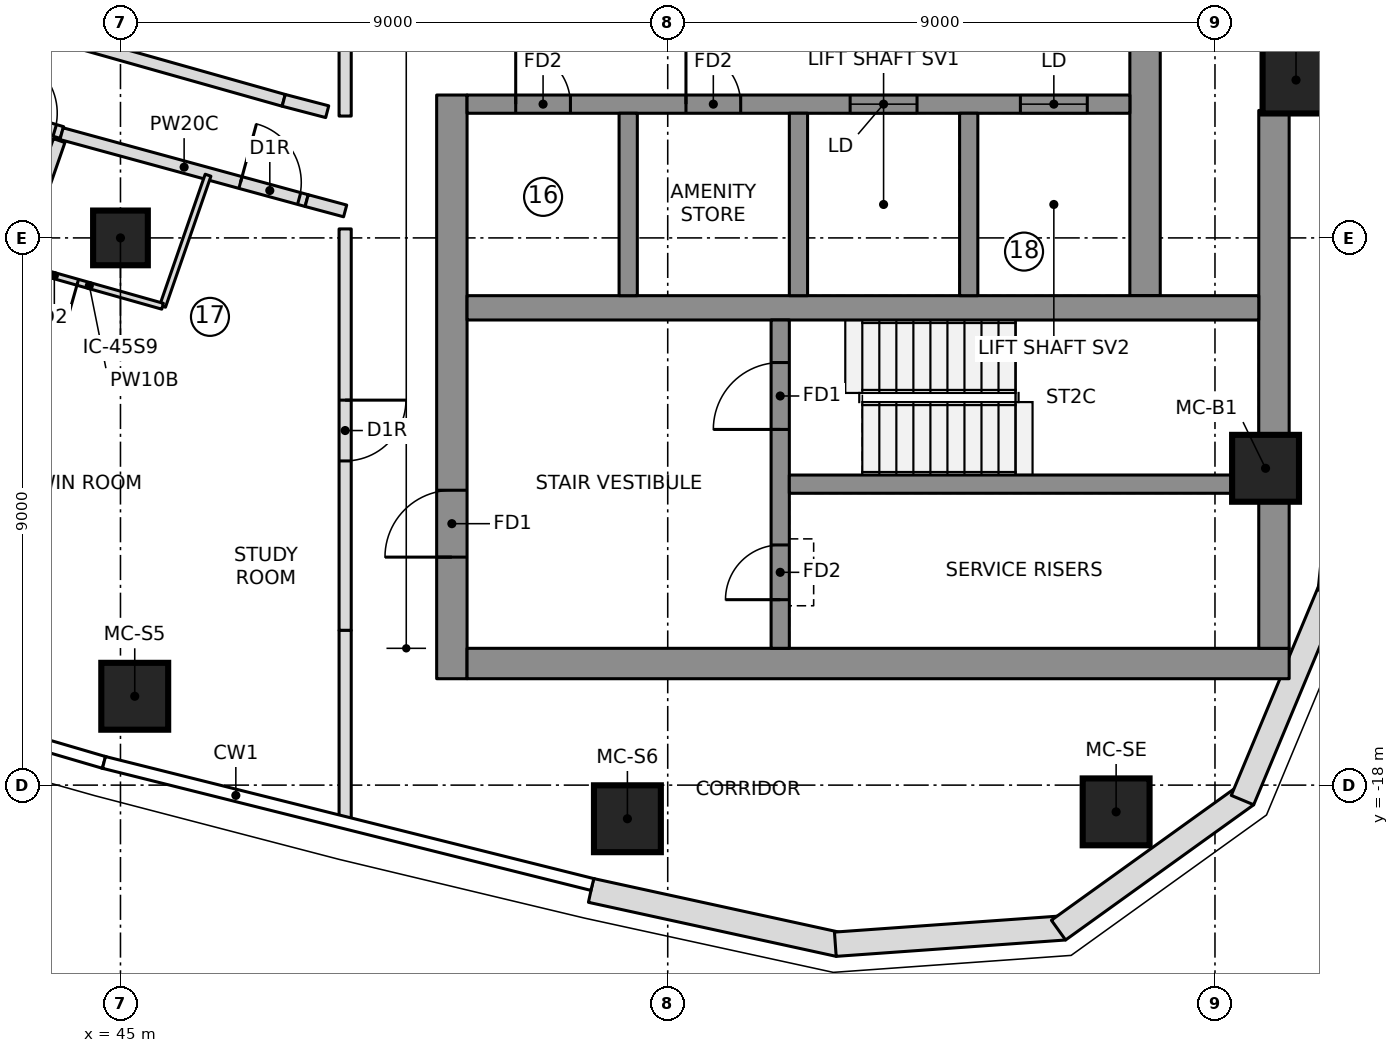
"""IFC4 building model, lengths in metres.
Left out: names, types, materials, properties, quantities, classifications, styles, units other than length and angle.
Written with IfcOpenShell. Run it as: python <this file> out.ifc"""

import sys

from ifc_helpers import new_model, si_unit, direction, frame, frame_2d, origin, origin_2d, place, context, subcontext, project, spatial, polyline, rectangle, outline, extrude, element, fill, save


model = new_model("IFC4")
c1 = context("Model", 3, precision=1e-05, world=origin(), true_north=direction((0.0, 1.0)))
c2 = subcontext(c1, "Body", "Model", "MODEL_VIEW")
j1 = project(units=[si_unit("LENGTHUNIT", "METRE"), si_unit("PLANEANGLEUNIT", "RADIAN")], contexts=[c1])
p1 = place(None, origin())
s1 = spatial("IfcSite", under=j1, at=p1, CompositionType="ELEMENT")
p2 = place(p1, origin())
s2 = spatial("IfcBuilding", under=s1, at=p2, CompositionType="ELEMENT")
p3 = place(p2, frame((0.0, 0.0, 296.3)))
s3 = spatial("IfcBuildingStorey", under=s2, at=p3, CompositionType="ELEMENT", Elevation=296.3)
p4 = place(p3, frame((50.45, -16.25, 0.0), z_axis=(0.0, 0.0, 1.0), x_axis=(0.0, 1.0, 0.0)))
e1 = element("IfcWall", 1, at=p4, inside=s3, PredefinedType="SHEAR", context=c2, shape_type="SweptSolid", body=[
    extrude(rectangle(XDim=9.6, YDim=0.5, at=frame_2d((4.8, 0.0))), origin(), (0.0, 0.0, 1.0), 3.55),
])
p5 = place(p4, frame((2.0, 0.0, 0.0)))
e2 = element("IfcOpeningElement", 2, at=p5, cuts=e1, PredefinedType="OPENING", context=c2, shape_type="SweptSolid", body=[
    extrude(rectangle(XDim=1.1, YDim=2.1, at=frame_2d((0.55, 1.05))), frame((0.0, 0.26, 0.0), z_axis=(0.0, -1.0, 0.0), x_axis=(1.0, 0.0, 0.0)), (0.0, 0.0, 1.0), 0.52),
])
p6 = place(p3, frame((50.7, -16.0, 0.0), z_axis=(0.0, 0.0, 1.0), x_axis=(1.0, 0.0, 0.0)))
e3 = element("IfcWall", 3, at=p6, inside=s3, PredefinedType="SHEAR", context=c2, shape_type="SweptSolid", body=[
    extrude(rectangle(XDim=13.52, YDim=0.5, at=frame_2d((6.76, 0.0))), origin(), (0.0, 0.0, 1.0), 3.55),
])
p7 = place(p3, frame((63.97, -15.75, 0.0), z_axis=(0.0, 0.0, 1.0), x_axis=(0.0, 1.0, 0.0)))
e4 = element("IfcWall", 4, at=p7, inside=s3, PredefinedType="SHEAR", context=c2, shape_type="SweptSolid", body=[
    extrude(rectangle(XDim=8.847, YDim=0.5, at=frame_2d((4.423, 0.0))), origin(), (0.0, 0.0, 1.0), 3.55),
])
p8 = place(p3, frame((61.85, -9.95, 0.0), z_axis=(0.0, 0.0, 1.0), x_axis=(0.0, 1.0, 0.0)))
e5 = element("IfcWall", 5, at=p8, inside=s3, PredefinedType="SHEAR", context=c2, shape_type="SweptSolid", body=[
    extrude(rectangle(XDim=19.9, YDim=0.5, at=frame_2d((9.95, 0.0))), origin(), (0.0, 0.0, 1.0), 3.55),
])
p9 = place(p3, frame((50.7, -10.15, 0.0), z_axis=(0.0, 0.0, 1.0), x_axis=(1.0, 0.0, 0.0)))
e6 = element("IfcWall", 6, at=p9, inside=s3, PredefinedType="SHEAR", context=c2, shape_type="SweptSolid", body=[
    extrude(rectangle(XDim=13.02, YDim=0.4, at=frame_2d((6.51, 0.0))), origin(), (0.0, 0.0, 1.0), 3.55),
])
p10 = place(p3, frame((50.7, -6.8, 0.0), z_axis=(0.0, 0.0, 1.0), x_axis=(1.0, 0.0, 0.0)))
e7 = element("IfcWall", 7, at=p10, inside=s3, PredefinedType="SHEAR", context=c2, shape_type="SweptSolid", body=[
    extrude(rectangle(XDim=10.9, YDim=0.3, at=frame_2d((5.45, 0.0))), origin(), (0.0, 0.0, 1.0), 3.55),
])
p11 = place(p10, frame((6.3, 0.0, 0.0)))
e8 = element("IfcOpeningElement", 8, at=p11, cuts=e7, PredefinedType="OPENING", context=c2, shape_type="SweptSolid", body=[
    extrude(rectangle(XDim=1.1, YDim=2.1, at=frame_2d((0.55, 1.05))), frame((0.0, 0.16, 0.0), z_axis=(0.0, -1.0, 0.0), x_axis=(1.0, 0.0, 0.0)), (0.0, 0.0, 1.0), 0.32),
])
p12 = place(p10, frame((9.1, 0.0, 0.0)))
e9 = element("IfcOpeningElement", 9, at=p12, cuts=e7, PredefinedType="OPENING", context=c2, shape_type="SweptSolid", body=[
    extrude(rectangle(XDim=1.1, YDim=2.1, at=frame_2d((0.55, 1.05))), frame((0.0, 0.16, 0.0), z_axis=(0.0, -1.0, 0.0), x_axis=(1.0, 0.0, 0.0)), (0.0, 0.0, 1.0), 0.32),
])
p13 = place(p10, frame((0.8, 0.0, 0.0)))
e10 = element("IfcOpeningElement", 10, at=p13, cuts=e7, PredefinedType="OPENING", context=c2, shape_type="SweptSolid", body=[
    extrude(rectangle(XDim=0.9, YDim=2.1, at=frame_2d((0.45, 1.05))), frame((0.0, 0.16, 0.0), z_axis=(0.0, -1.0, 0.0), x_axis=(1.0, 0.0, 0.0)), (0.0, 0.0, 1.0), 0.32),
])
p14 = place(p10, frame((3.6, 0.0, 0.0)))
e11 = element("IfcOpeningElement", 11, at=p14, cuts=e7, PredefinedType="OPENING", context=c2, shape_type="SweptSolid", body=[
    extrude(rectangle(XDim=0.9, YDim=2.1, at=frame_2d((0.45, 1.05))), frame((0.0, 0.16, 0.0), z_axis=(0.0, -1.0, 0.0), x_axis=(1.0, 0.0, 0.0)), (0.0, 0.0, 1.0), 0.32),
])
for number, where, z_axis, x_axis in (
    (12, (53.35, -9.95, 0.0), (0.0, 0.0, 1.0), (0.0, 1.0, 0.0)),
    (13, (56.15, -9.95, 0.0), (0.0, 0.0, 1.0), (0.0, 1.0, 0.0)),
    (14, (58.95, -9.95, 0.0), (0.0, 0.0, 1.0), (0.0, 1.0, 0.0)),
):
    element("IfcWall", number, at=place(p3, frame(where, z_axis=z_axis, x_axis=x_axis)), inside=s3, PredefinedType="SHEAR", context=c2, shape_type="SweptSolid", body=[
        extrude(rectangle(XDim=3.0, YDim=0.3, at=frame_2d((1.5, 0.0))), origin(), (0.0, 0.0, 1.0), 3.55),
    ])
p15 = place(p3, frame((55.85, -15.75, 0.0), z_axis=(0.0, 0.0, 1.0), x_axis=(0.0, 1.0, 0.0)))
e15 = element("IfcWall", 15, at=p15, inside=s3, PredefinedType="SHEAR", context=c2, shape_type="SweptSolid", body=[
    extrude(rectangle(XDim=5.4, YDim=0.3, at=frame_2d((2.7, 0.0))), origin(), (0.0, 0.0, 1.0), 3.55),
])
p16 = place(p15, frame((3.6, 0.0, 0.0)))
e16 = element("IfcOpeningElement", 16, at=p16, cuts=e15, PredefinedType="OPENING", context=c2, shape_type="SweptSolid", body=[
    extrude(rectangle(XDim=1.1, YDim=2.1, at=frame_2d((0.55, 1.05))), frame((0.0, 0.16, 0.0), z_axis=(0.0, -1.0, 0.0), x_axis=(1.0, 0.0, 0.0)), (0.0, 0.0, 1.0), 0.32),
])
p17 = place(p15, frame((0.8, 0.0, 0.0)))
e17 = element("IfcOpeningElement", 17, at=p17, cuts=e15, PredefinedType="OPENING", context=c2, shape_type="SweptSolid", body=[
    extrude(rectangle(XDim=0.9, YDim=2.1, at=frame_2d((0.45, 1.05))), frame((0.0, 0.16, 0.0), z_axis=(0.0, -1.0, 0.0), x_axis=(1.0, 0.0, 0.0)), (0.0, 0.0, 1.0), 0.32),
])
p18 = place(p3, frame((56.0, -13.05, 0.0), z_axis=(0.0, 0.0, 1.0), x_axis=(1.0, 0.0, 0.0)))
e18 = element("IfcWall", 18, at=p18, inside=s3, PredefinedType="SHEAR", context=c2, shape_type="SweptSolid", body=[
    extrude(rectangle(XDim=7.72, YDim=0.3, at=frame_2d((3.86, 0.0))), origin(), (0.0, 0.0, 1.0), 3.55),
])
for number, where, z_axis, x_axis in (
    (19, (45.235, -16.539, 0.0), (0.0, 0.0, 1.0), (1.0, 0.0, 0.0)),
    (20, (53.337, -18.553, 0.0), (0.0, 0.0, 1.0), (1.0, 0.0, 0.0)),
    (21, (61.374, -18.44, 0.0), (0.0, 0.0, 1.0), (1.0, 0.0, 0.0)),
    (22, (63.832, -12.789, 0.0), (0.0, 0.0, 1.0), (1.0, 0.0, 0.0)),
    (23, (64.333, -6.403, 0.0), (0.0, 0.0, 1.0), (1.0, 0.0, 0.0)),
):
    element("IfcColumn", number, at=place(p3, frame(where, z_axis=z_axis, x_axis=x_axis)), inside=s3, PredefinedType="COLUMN", context=c2, shape_type="SweptSolid", body=[
        extrude(rectangle(XDim=1.1, YDim=1.1, at=origin_2d()), origin(), (0.0, 0.0, 1.0), 3.55),
    ])
p19 = place(p3, frame((45.0, -9.0, 0.0), z_axis=(0.0, 0.0, 1.0), x_axis=(1.0, 0.0, 0.0)))
e24 = element("IfcColumn", 24, at=p19, inside=s3, PredefinedType="COLUMN", context=c2, shape_type="SweptSolid", body=[
    extrude(rectangle(XDim=0.9, YDim=0.9, at=origin_2d()), origin(), (0.0, 0.0, 1.0), 3.55),
])
p20 = place(p3, frame((52.738, -19.732, 0.0), z_axis=(0.0, 0.0, 1.0), x_axis=(0.977020225348, -0.213146614471, 0.0)))
e25 = element("IfcWall", 25, at=p20, inside=s3, PredefinedType="NOTDEFINED", context=c2, shape_type="SweptSolid", body=[
    extrude(outline(polyline([(0.0, -0.2), (4.171, -0.2), (4.113, 0.2), (0.0, 0.2), (0.0, -0.2)])), origin(), (0.0, 0.0, 1.0), 3.25),
])
p21 = place(p3, frame((56.785, -20.615, 0.0), z_axis=(0.0, 0.0, 1.0), x_axis=(0.99746272096, 0.071190731806, 0.0)))
e26 = element("IfcWall", 26, at=p21, inside=s3, PredefinedType="NOTDEFINED", context=c2, shape_type="SweptSolid", body=[
    extrude(outline(polyline([(-0.029, -0.2), (3.753, -0.2), (3.64, 0.2), (0.029, 0.2), (-0.029, -0.2)])), origin(), (0.0, 0.0, 1.0), 3.25),
])
p22 = place(p3, frame((60.472, -20.352, 0.0), z_axis=(0.0, 0.0, 1.0), x_axis=(0.811962548682, 0.583709533533, 0.0)))
e27 = element("IfcWall", 27, at=p22, inside=s3, PredefinedType="NOTDEFINED", context=c2, shape_type="SweptSolid", body=[
    extrude(outline(polyline([(-0.057, -0.2), (3.753, -0.2), (3.64, 0.2), (0.057, 0.2), (-0.057, -0.2)])), origin(), (0.0, 0.0, 1.0), 3.25),
])
p23 = place(p3, frame((63.474, -18.194, 0.0), z_axis=(0.0, 0.0, 1.0), x_axis=(0.385285857918, 0.922797273343, 0.0)))
e28 = element("IfcWall", 28, at=p23, inside=s3, PredefinedType="NOTDEFINED", context=c2, shape_type="SweptSolid", body=[
    extrude(outline(polyline([(-0.057, -0.2), (3.726, -0.2), (3.667, 0.2), (0.057, 0.2), (-0.057, -0.2)])), origin(), (0.0, 0.0, 1.0), 3.25),
])
p24 = place(p3, frame((64.898, -14.782, 0.0), z_axis=(0.0, 0.0, 1.0), x_axis=(0.102249826987, 0.994758751096, 0.0)))
e29 = element("IfcWall", 29, at=p24, inside=s3, PredefinedType="NOTDEFINED", context=c2, shape_type="SweptSolid", body=[
    extrude(outline(polyline([(-0.03, -0.2), (4.237, -0.2), (4.23, 0.2), (0.03, 0.2), (-0.03, -0.2)])), origin(), (0.0, 0.0, 1.0), 3.25),
])
p25 = place(p3, frame((40.035, -6.083, 0.0), z_axis=(0.0, 0.0, 1.0), x_axis=(0.958901312153, -0.283739799027, 0.0)))
e30 = element("IfcWall", 30, at=p25, inside=s3, PredefinedType="PARTITIONING", context=c2, shape_type="SweptSolid", body=[
    extrude(rectangle(XDim=4.174, YDim=0.2, at=frame_2d((2.087, 0.0))), origin(), (0.0, 0.0, 1.0), 3.25),
])
p26 = place(p25, frame((3.05, 0.0, 0.0)))
e31 = element("IfcOpeningElement", 31, at=p26, cuts=e30, PredefinedType="OPENING", context=c2, shape_type="SweptSolid", body=[
    extrude(rectangle(XDim=1.0, YDim=2.1, at=frame_2d((0.5, 1.05))), frame((0.0, 0.11, 0.0), z_axis=(0.0, -1.0, 0.0), x_axis=(1.0, 0.0, 0.0)), (0.0, 0.0, 1.0), 0.22),
])
p27 = place(p3, frame((40.854, -16.447, 0.0), z_axis=(0.0, 0.0, 1.0), x_axis=(0.327714654767, 0.944776748788, 0.0)))
e32 = element("IfcWall", 32, at=p27, inside=s3, PredefinedType="PARTITIONING", context=c2, shape_type="SweptSolid", body=[
    extrude(rectangle(XDim=9.577, YDim=0.2, at=frame_2d((4.788, 0.0))), origin(), (0.0, 0.0, 1.0), 3.25),
])
p28 = place(p3, frame((44.031, -7.286, 0.0), z_axis=(0.0, 0.0, 1.0), x_axis=(0.964708521199, -0.263320088726, 0.0)))
e33 = element("IfcWall", 33, at=p28, inside=s3, PredefinedType="PARTITIONING", context=c2, shape_type="SweptSolid", body=[
    extrude(rectangle(XDim=4.179, YDim=0.2, at=frame_2d((2.089, 0.0))), origin(), (0.0, 0.0, 1.0), 3.25),
])
p29 = place(p28, frame((3.05, 0.0, 0.0)))
e34 = element("IfcOpeningElement", 34, at=p29, cuts=e33, PredefinedType="OPENING", context=c2, shape_type="SweptSolid", body=[
    extrude(rectangle(XDim=1.0, YDim=2.1, at=frame_2d((0.5, 1.05))), frame((0.0, 0.11, 0.0), z_axis=(0.0, -1.0, 0.0), x_axis=(1.0, 0.0, 0.0)), (0.0, 0.0, 1.0), 0.22),
])
p30 = place(p3, frame((46.44, -7.969, 0.0), z_axis=(0.0, 0.0, 1.0), x_axis=(-0.327764902685, -0.944759317799, 0.0)))
e35 = element("IfcWall", 35, at=p30, inside=s3, PredefinedType="PARTITIONING", context=c2, shape_type="SweptSolid", body=[
    extrude(rectangle(XDim=2.281, YDim=0.1, at=frame_2d((1.14, 0.0))), origin(), (0.0, 0.0, 1.0), 3.25),
])
p31 = place(p3, frame((45.693, -10.124, 0.0), z_axis=(0.0, 0.0, 1.0), x_axis=(-0.962409173596, 0.271603723424, 0.0)))
e36 = element("IfcWall", 36, at=p31, inside=s3, PredefinedType="PARTITIONING", context=c2, shape_type="SweptSolid", body=[
    extrude(rectangle(XDim=2.504, YDim=0.1, at=frame_2d((1.252, 0.0))), origin(), (0.0, 0.0, 1.0), 3.25),
])
p32 = place(p31, frame((1.45, 0.0, 0.0)))
e37 = element("IfcOpeningElement", 37, at=p32, cuts=e36, PredefinedType="OPENING", context=c2, shape_type="SweptSolid", body=[
    extrude(rectangle(XDim=0.8, YDim=2.1, at=frame_2d((0.4, 1.05))), frame((0.0, 0.06, 0.0), z_axis=(0.0, -1.0, 0.0), x_axis=(1.0, 0.0, 0.0)), (0.0, 0.0, 1.0), 0.12),
])
p33 = place(p3, frame((47.684, -6.738, 0.0), z_axis=(0.0, 0.0, 1.0), x_axis=(-0.962411212211, 0.271596499628, 0.0)))
e38 = element("IfcWall", 38, at=p33, inside=s3, PredefinedType="PARTITIONING", context=c2, shape_type="SweptSolid", body=[
    extrude(rectangle(XDim=3.913, YDim=0.2, at=frame_2d((1.957, 0.0))), origin(), (0.0, 0.0, 1.0), 3.25),
])
p34 = place(p3, frame((48.4, -6.924, 0.0), z_axis=(0.0, 0.0, 1.0), x_axis=(-0.967585713416, 0.252542842294, 0.0)))
e39 = element("IfcWall", 39, at=p34, inside=s3, PredefinedType="PARTITIONING", context=c2, shape_type="SweptSolid", body=[
    extrude(rectangle(XDim=0.74, YDim=0.2, at=frame_2d((0.37, 0.0))), origin(), (0.0, 0.0, 1.0), 3.25),
])
p35 = place(p3, frame((48.695, -8.852, 0.0), z_axis=(0.0, 0.0, 1.0), x_axis=(0.0, -1.0, 0.0)))
e40 = element("IfcWall", 40, at=p35, inside=s3, PredefinedType="PARTITIONING", context=c2, shape_type="SweptSolid", body=[
    extrude(rectangle(XDim=6.603, YDim=0.2, at=frame_2d((3.302, 0.0))), origin(), (0.0, 0.0, 1.0), 3.25),
])
p36 = place(p35, frame((2.816, 0.0, 0.0)))
e41 = element("IfcOpeningElement", 41, at=p36, cuts=e40, PredefinedType="OPENING", context=c2, shape_type="SweptSolid", body=[
    extrude(rectangle(XDim=1.0, YDim=2.1, at=frame_2d((0.5, 1.05))), frame((0.0, 0.11, 0.0), z_axis=(0.0, -1.0, 0.0), x_axis=(1.0, 0.0, 0.0)), (0.0, 0.0, 1.0), 0.22),
])
p37 = place(p3, frame((48.695, 6.996, 0.0), z_axis=(0.0, 0.0, 1.0), x_axis=(0.0, -1.0, 0.0)))
e42 = element("IfcWall", 42, at=p37, inside=s3, PredefinedType="PARTITIONING", context=c2, shape_type="SweptSolid", body=[
    extrude(rectangle(XDim=13.992, YDim=0.2, at=frame_2d((6.996, 0.0))), origin(), (0.0, 0.0, 1.0), 3.25),
])
p38 = place(p3, frame((48.062, -8.386, 0.0), z_axis=(0.0, 0.0, 1.0), x_axis=(0.965669715173, -0.259772980114, 0.0)))
e43 = element("IfcWall", 43, at=p38, inside=s3, PredefinedType="PARTITIONING", context=c2, shape_type="SweptSolid", body=[
    extrude(rectangle(XDim=0.655, YDim=0.2, at=frame_2d((0.328, 0.0))), origin(), (0.0, 0.0, 1.0), 3.25),
])
p39 = place(p3, frame((48.695, -15.455, 0.0), z_axis=(0.0, 0.0, 1.0), x_axis=(0.0, -1.0, 0.0)))
e44 = element("IfcWall", 44, at=p39, inside=s3, PredefinedType="PARTITIONING", context=c2, shape_type="SweptSolid", body=[
    extrude(rectangle(XDim=3.098, YDim=0.2, at=frame_2d((1.549, 0.0))), origin(), (0.0, 0.0, 1.0), 3.25),
])
p40 = place(p26, origin())
e45 = element("IfcDoor", 45, at=p40, inside=s3, OperationType="SINGLE_SWING_RIGHT", PredefinedType="DOOR", context=c2, shape_type="SweptSolid", body=[
    extrude(rectangle(XDim=1.0, YDim=2.1, at=frame_2d((0.5, 1.05))), frame((0.0, 0.025, 0.0), z_axis=(0.0, -1.0, 0.0), x_axis=(1.0, 0.0, 0.0)), (0.0, 0.0, 1.0), 0.05),
])
fill(e31, e45)
p41 = place(p32, origin())
e46 = element("IfcDoor", 46, at=p41, inside=s3, OperationType="SINGLE_SWING_LEFT", PredefinedType="DOOR", context=c2, shape_type="SweptSolid", body=[
    extrude(rectangle(XDim=0.8, YDim=2.1, at=frame_2d((0.4, 1.05))), frame((0.0, 0.025, 0.0), z_axis=(0.0, -1.0, 0.0), x_axis=(1.0, 0.0, 0.0)), (0.0, 0.0, 1.0), 0.05),
])
fill(e37, e46)
p42 = place(p29, origin())
e47 = element("IfcDoor", 47, at=p42, inside=s3, OperationType="SINGLE_SWING_RIGHT", PredefinedType="DOOR", context=c2, shape_type="SweptSolid", body=[
    extrude(rectangle(XDim=1.0, YDim=2.1, at=frame_2d((0.5, 1.05))), frame((0.0, 0.025, 0.0), z_axis=(0.0, -1.0, 0.0), x_axis=(1.0, 0.0, 0.0)), (0.0, 0.0, 1.0), 0.05),
])
fill(e34, e47)
p43 = place(p36, origin())
e48 = element("IfcDoor", 48, at=p43, inside=s3, OperationType="SINGLE_SWING_RIGHT", PredefinedType="DOOR", context=c2, shape_type="SweptSolid", body=[
    extrude(rectangle(XDim=1.0, YDim=2.1, at=frame_2d((0.5, 1.05))), frame((0.0, 0.025, 0.0), z_axis=(0.0, -1.0, 0.0), x_axis=(1.0, 0.0, 0.0)), (0.0, 0.0, 1.0), 0.05),
])
fill(e41, e48)
p44 = place(p11, origin())
e49 = element("IfcDoor", 49, at=p44, inside=s3, OperationType="DOUBLE_DOOR_SLIDING", PredefinedType="DOOR", context=c2, shape_type="SweptSolid", body=[
    extrude(rectangle(XDim=1.1, YDim=2.1, at=frame_2d((0.55, 1.05))), frame((0.0, 0.025, 0.0), z_axis=(0.0, -1.0, 0.0), x_axis=(1.0, 0.0, 0.0)), (0.0, 0.0, 1.0), 0.05),
])
fill(e8, e49)
p45 = place(p12, origin())
e50 = element("IfcDoor", 50, at=p45, inside=s3, OperationType="DOUBLE_DOOR_SLIDING", PredefinedType="DOOR", context=c2, shape_type="SweptSolid", body=[
    extrude(rectangle(XDim=1.1, YDim=2.1, at=frame_2d((0.55, 1.05))), frame((0.0, 0.025, 0.0), z_axis=(0.0, -1.0, 0.0), x_axis=(1.0, 0.0, 0.0)), (0.0, 0.0, 1.0), 0.05),
])
fill(e9, e50)
p46 = place(p16, origin())
e51 = element("IfcDoor", 51, at=p46, inside=s3, OperationType="SINGLE_SWING_RIGHT", PredefinedType="DOOR", context=c2, shape_type="SweptSolid", body=[
    extrude(rectangle(XDim=1.1, YDim=2.1, at=frame_2d((0.55, 1.05))), frame((0.0, 0.025, 0.0), z_axis=(0.0, -1.0, 0.0), x_axis=(1.0, 0.0, 0.0)), (0.0, 0.0, 1.0), 0.05),
])
fill(e16, e51)
p47 = place(p5, origin())
e52 = element("IfcDoor", 52, at=p47, inside=s3, OperationType="SINGLE_SWING_RIGHT", PredefinedType="DOOR", context=c2, shape_type="SweptSolid", body=[
    extrude(rectangle(XDim=1.1, YDim=2.1, at=frame_2d((0.55, 1.05))), frame((0.0, 0.025, 0.0), z_axis=(0.0, -1.0, 0.0), x_axis=(1.0, 0.0, 0.0)), (0.0, 0.0, 1.0), 0.05),
])
fill(e2, e52)
p48 = place(p17, origin())
e53 = element("IfcDoor", 53, at=p48, inside=s3, OperationType="SINGLE_SWING_LEFT", PredefinedType="DOOR", context=c2, shape_type="SweptSolid", body=[
    extrude(rectangle(XDim=0.9, YDim=2.1, at=frame_2d((0.45, 1.05))), frame((0.0, 0.025, 0.0), z_axis=(0.0, -1.0, 0.0), x_axis=(1.0, 0.0, 0.0)), (0.0, 0.0, 1.0), 0.05),
])
fill(e17, e53)
p49 = place(p13, origin())
e54 = element("IfcDoor", 54, at=p49, inside=s3, OperationType="SINGLE_SWING_LEFT", PredefinedType="DOOR", context=c2, shape_type="SweptSolid", body=[
    extrude(rectangle(XDim=0.9, YDim=2.1, at=frame_2d((0.45, 1.05))), frame((0.0, 0.025, 0.0), z_axis=(0.0, -1.0, 0.0), x_axis=(1.0, 0.0, 0.0)), (0.0, 0.0, 1.0), 0.05),
])
fill(e10, e54)
p50 = place(p14, origin())
e55 = element("IfcDoor", 55, at=p50, inside=s3, OperationType="SINGLE_SWING_LEFT", PredefinedType="DOOR", context=c2, shape_type="SweptSolid", body=[
    extrude(rectangle(XDim=0.9, YDim=2.1, at=frame_2d((0.45, 1.05))), frame((0.0, 0.025, 0.0), z_axis=(0.0, -1.0, 0.0), x_axis=(1.0, 0.0, 0.0)), (0.0, 0.0, 1.0), 0.05),
])
fill(e11, e55)
save(model, sys.argv[1])
